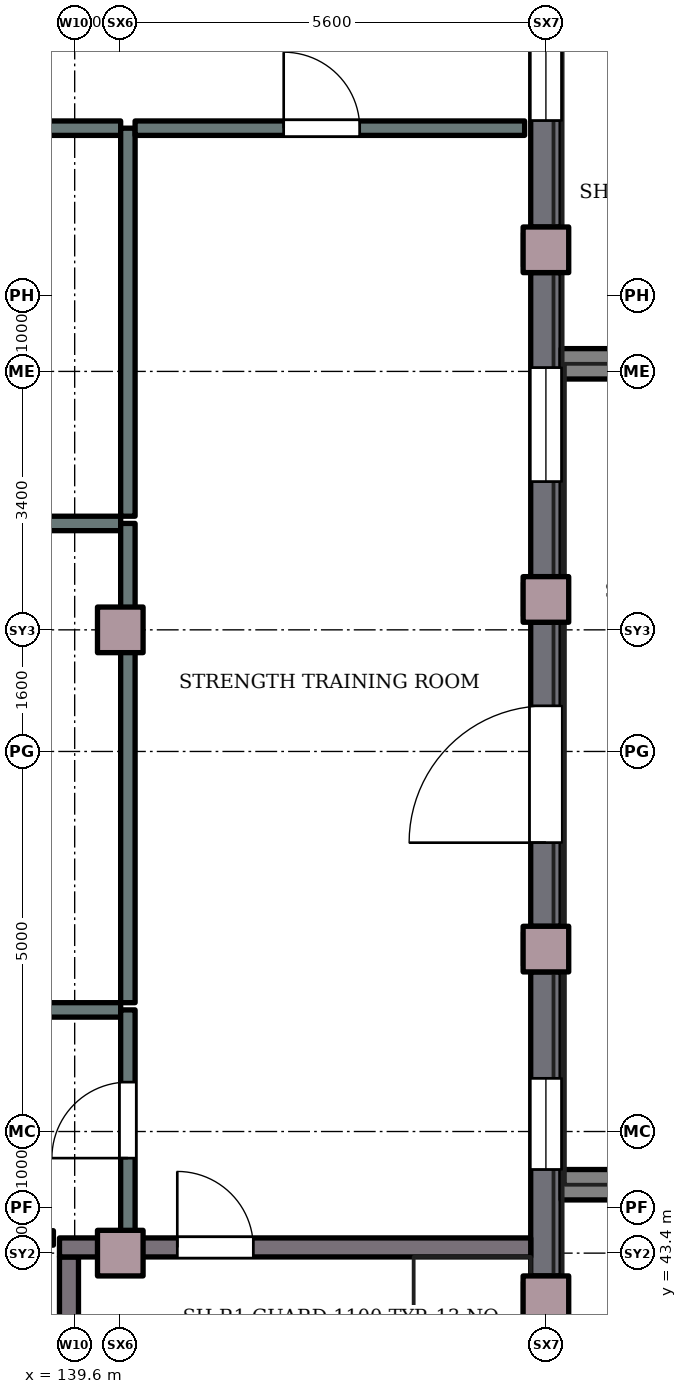
"""IFC4 building model, lengths in metres.
Left out: names, types, materials, properties, quantities, classifications, styles, units other than length and angle.
Written with IfcOpenShell. Run it as: python <this file> out.ifc"""

import sys

from ifc_helpers import new_model, si_unit, direction, frame, frame_2d, origin, origin_2d, place, context, subcontext, project, spatial, rectangle, extrude, element, fill, save


model = new_model("IFC4")
c1 = context("Model", 3, precision=1e-05, world=origin(), true_north=direction((0.0, 1.0)))
c2 = subcontext(c1, "Body", "Model", "MODEL_VIEW")
j1 = project(units=[si_unit("LENGTHUNIT", "METRE"), si_unit("PLANEANGLEUNIT", "RADIAN")], contexts=[c1])
p1 = place(None, origin())
s1 = spatial("IfcSite", under=j1, at=p1, CompositionType="ELEMENT")
p2 = place(p1, origin())
s2 = spatial("IfcBuilding", under=s1, at=p2, CompositionType="ELEMENT")
p3 = place(p2, origin())
s3 = spatial("IfcBuildingStorey", under=s2, at=p3, CompositionType="ELEMENT", Elevation=0.0)
for number, where, z_axis, x_axis in (
    (1, (145.8, 42.8, 0.0), (0.0, 0.0, 1.0), (1.0, 0.0, 0.0)),
    (2, (145.8, 47.4, 0.0), (0.0, 0.0, 1.0), (1.0, 0.0, 0.0)),
    (3, (145.8, 52.0, 0.0), (0.0, 0.0, 1.0), (1.0, 0.0, 0.0)),
    (4, (145.8, 56.6, 0.0), (0.0, 0.0, 1.0), (1.0, 0.0, 0.0)),
    (5, (140.2, 51.6, 0.0), (0.0, 0.0, 1.0), (1.0, 0.0, 0.0)),
    (6, (140.2, 43.4, 0.0), (0.0, 0.0, 1.0), (1.0, 0.0, 0.0)),
):
    element("IfcColumn", number, at=place(p3, frame(where, z_axis=z_axis, x_axis=x_axis)), inside=s3, PredefinedType="COLUMN", context=c2, shape_type="SweptSolid", body=[
        extrude(rectangle(XDim=0.6, YDim=0.6, at=origin_2d()), origin(), (0.0, 0.0, 1.0), 4.2),
    ])
p4 = place(p3, frame((145.8, 43.1, 0.0), z_axis=(0.0, 0.0, 1.0), x_axis=(0.0, 1.0, 0.0)))
e7 = element("IfcWall", 7, at=p4, inside=s3, PredefinedType="SOLIDWALL", context=c2, shape_type="SweptSolid", body=[
    extrude(rectangle(XDim=4.0, YDim=0.4, at=frame_2d((2.0, 0.0))), origin(), (0.0, 0.0, 1.0), 4.2),
])
p5 = place(p4, frame((1.4, 0.0, 1.2)))
e8 = element("IfcOpeningElement", 8, at=p5, cuts=e7, PredefinedType="OPENING", context=c2, shape_type="SweptSolid", body=[
    extrude(rectangle(XDim=1.2, YDim=1.8, at=frame_2d((0.6, 0.9))), frame((0.0, 0.21, 0.0), z_axis=(0.0, -1.0, 0.0), x_axis=(1.0, 0.0, 0.0)), (0.0, 0.0, 1.0), 0.42),
])
p6 = place(p3, frame((145.8, 47.7, 0.0), z_axis=(0.0, 0.0, 1.0), x_axis=(0.0, 1.0, 0.0)))
e9 = element("IfcWall", 9, at=p6, inside=s3, PredefinedType="SOLIDWALL", context=c2, shape_type="SweptSolid", body=[
    extrude(rectangle(XDim=4.0, YDim=0.4, at=frame_2d((2.0, 0.0))), origin(), (0.0, 0.0, 1.0), 4.2),
])
p7 = place(p6, frame((1.1, 0.0, 0.0)))
e10 = element("IfcOpeningElement", 10, at=p7, cuts=e9, PredefinedType="OPENING", context=c2, shape_type="SweptSolid", body=[
    extrude(rectangle(XDim=1.8, YDim=2.1, at=frame_2d((0.9, 1.05))), frame((0.0, 0.21, 0.0), z_axis=(0.0, -1.0, 0.0), x_axis=(1.0, 0.0, 0.0)), (0.0, 0.0, 1.0), 0.42),
])
p8 = place(p3, frame((145.8, 52.3, 0.0), z_axis=(0.0, 0.0, 1.0), x_axis=(0.0, 1.0, 0.0)))
e11 = element("IfcWall", 11, at=p8, inside=s3, PredefinedType="SOLIDWALL", context=c2, shape_type="SweptSolid", body=[
    extrude(rectangle(XDim=4.0, YDim=0.4, at=frame_2d((2.0, 0.0))), origin(), (0.0, 0.0, 1.0), 4.2),
])
p9 = place(p8, frame((1.25, 0.0, 0.9)))
e12 = element("IfcOpeningElement", 12, at=p9, cuts=e11, PredefinedType="OPENING", context=c2, shape_type="SweptSolid", body=[
    extrude(rectangle(XDim=1.5, YDim=2.0, at=frame_2d((0.75, 1.0))), frame((0.0, 0.21, 0.0), z_axis=(0.0, -1.0, 0.0), x_axis=(1.0, 0.0, 0.0)), (0.0, 0.0, 1.0), 0.42),
])
p10 = place(p3, frame((145.8, 56.9, 0.0), z_axis=(0.0, 0.0, 1.0), x_axis=(0.0, 1.0, 0.0)))
e13 = element("IfcWall", 13, at=p10, inside=s3, PredefinedType="SOLIDWALL", context=c2, shape_type="SweptSolid", body=[
    extrude(rectangle(XDim=4.0, YDim=0.4, at=frame_2d((2.0, 0.0))), origin(), (0.0, 0.0, 1.0), 4.2),
])
p11 = place(p10, frame((1.4, 0.0, 1.2)))
e14 = element("IfcOpeningElement", 14, at=p11, cuts=e13, PredefinedType="OPENING", context=c2, shape_type="SweptSolid", body=[
    extrude(rectangle(XDim=1.2, YDim=1.8, at=frame_2d((0.6, 0.9))), frame((0.0, 0.21, 0.0), z_axis=(0.0, -1.0, 0.0), x_axis=(1.0, 0.0, 0.0)), (0.0, 0.0, 1.0), 0.42),
])
p12 = place(p3, frame((139.525, 38.4, 0.0), z_axis=(0.0, 0.0, 1.0), x_axis=(0.0, 1.0, 0.0)))
e15 = element("IfcWall", 15, at=p12, inside=s3, PredefinedType="SHEAR", context=c2, shape_type="SweptSolid", body=[
    extrude(rectangle(XDim=4.95, YDim=0.25, at=frame_2d((2.475, 0.0))), origin(), (0.0, 0.0, 1.0), 4.2),
])
p13 = place(p3, frame((139.4, 43.475, 0.0), z_axis=(0.0, 0.0, 1.0), x_axis=(1.0, 0.0, 0.0)))
e16 = element("IfcWall", 16, at=p13, inside=s3, PredefinedType="SHEAR", context=c2, shape_type="SweptSolid", body=[
    extrude(rectangle(XDim=6.2, YDim=0.25, at=frame_2d((3.1, 0.0))), origin(), (0.0, 0.0, 1.0), 4.2),
])
p14 = place(p13, frame((1.55, 0.0, 0.0)))
e17 = element("IfcOpeningElement", 17, at=p14, cuts=e16, PredefinedType="OPENING", context=c2, shape_type="SweptSolid", body=[
    extrude(rectangle(XDim=1.0, YDim=2.1, at=frame_2d((0.5, 1.05))), frame((0.0, 0.135, 0.0), z_axis=(0.0, -1.0, 0.0), x_axis=(1.0, 0.0, 0.0)), (0.0, 0.0, 1.0), 0.27),
])
for number, where, z_axis, x_axis in (
    (18, (148.1, 55.1, 0.0), (0.0, 0.0, 1.0), (-1.0, 0.0, 0.0)),
    (19, (148.1, 44.3, 0.0), (0.0, 0.0, 1.0), (-1.0, 0.0, 0.0)),
):
    element("IfcWall", number, at=place(p3, frame(where, z_axis=z_axis, x_axis=x_axis)), inside=s3, PredefinedType="STANDARD", context=c2, shape_type="SweptSolid", body=[
        extrude(rectangle(XDim=2.1, YDim=0.4, at=frame_2d((1.05, 0.0))), origin(), (0.0, 0.0, 1.0), 4.2),
    ])
p15 = place(p3, frame((139.32, 43.6, 0.0), z_axis=(0.0, 0.0, 1.0), x_axis=(-1.0, 0.0, 0.0)))
e20 = element("IfcWall", 20, at=p15, inside=s3, PredefinedType="PARTITIONING", context=c2, shape_type="SweptSolid", body=[
    extrude(rectangle(XDim=1.825, YDim=0.19, at=frame_2d((0.913, 0.0))), origin(), (0.0, 0.0, 1.0), 3.9),
])
p16 = place(p15, frame((0.57, 0.0, 0.0)))
e21 = element("IfcOpeningElement", 21, at=p16, cuts=e20, PredefinedType="OPENING", context=c2, shape_type="SweptSolid", body=[
    extrude(rectangle(XDim=0.9, YDim=2.1, at=frame_2d((0.45, 1.05))), frame((0.0, 0.105, 0.0), z_axis=(0.0, -1.0, 0.0), x_axis=(1.0, 0.0, 0.0)), (0.0, 0.0, 1.0), 0.21),
])
p17 = place(p3, frame((140.205, 46.6, 0.0), z_axis=(0.0, 0.0, 1.0), x_axis=(-1.0, 0.0, 0.0)))
e22 = element("IfcWall", 22, at=p17, inside=s3, PredefinedType="PARTITIONING", context=c2, shape_type="SweptSolid", body=[
    extrude(rectangle(XDim=4.96, YDim=0.19, at=frame_2d((2.48, 0.0))), origin(), (0.0, 0.0, 1.0), 3.9),
])
p18 = place(p17, frame((2.005, 0.0, 0.0)))
e23 = element("IfcOpeningElement", 23, at=p18, cuts=e22, PredefinedType="OPENING", context=c2, shape_type="SweptSolid", body=[
    extrude(rectangle(XDim=1.0, YDim=2.1, at=frame_2d((0.5, 1.05))), frame((0.0, 0.105, 0.0), z_axis=(0.0, -1.0, 0.0), x_axis=(1.0, 0.0, 0.0)), (0.0, 0.0, 1.0), 0.21),
])
p19 = place(p3, frame((140.205, 53.0, 0.0), z_axis=(0.0, 0.0, 1.0), x_axis=(-1.0, 0.0, 0.0)))
e24 = element("IfcWall", 24, at=p19, inside=s3, PredefinedType="PARTITIONING", context=c2, shape_type="SweptSolid", body=[
    extrude(rectangle(XDim=4.96, YDim=0.19, at=frame_2d((2.48, 0.0))), origin(), (0.0, 0.0, 1.0), 3.9),
])
p20 = place(p3, frame((140.205, 58.2, 0.0), z_axis=(0.0, 0.0, 1.0), x_axis=(-1.0, 0.0, 0.0)))
e25 = element("IfcWall", 25, at=p20, inside=s3, PredefinedType="PARTITIONING", context=c2, shape_type="SweptSolid", body=[
    extrude(rectangle(XDim=4.96, YDim=0.19, at=frame_2d((2.48, 0.0))), origin(), (0.0, 0.0, 1.0), 3.9),
])
p21 = place(p20, frame((1.955, 0.0, 0.0)))
e26 = element("IfcOpeningElement", 26, at=p21, cuts=e25, PredefinedType="OPENING", context=c2, shape_type="SweptSolid", body=[
    extrude(rectangle(XDim=1.0, YDim=2.1, at=frame_2d((0.5, 1.05))), frame((0.0, 0.105, 0.0), z_axis=(0.0, -1.0, 0.0), x_axis=(1.0, 0.0, 0.0)), (0.0, 0.0, 1.0), 0.21),
])
p22 = place(p3, frame((140.3, 43.68, 0.0), z_axis=(0.0, 0.0, 1.0), x_axis=(0.0, 1.0, 0.0)))
e27 = element("IfcWall", 27, at=p22, inside=s3, PredefinedType="PARTITIONING", context=c2, shape_type="SweptSolid", body=[
    extrude(rectangle(XDim=2.92, YDim=0.19, at=frame_2d((1.46, 0.0))), origin(), (0.0, 0.0, 1.0), 3.9),
])
p23 = place(p22, frame((0.97, 0.0, 0.0)))
e28 = element("IfcOpeningElement", 28, at=p23, cuts=e27, PredefinedType="OPENING", context=c2, shape_type="SweptSolid", body=[
    extrude(rectangle(XDim=1.0, YDim=2.1, at=frame_2d((0.5, 1.05))), frame((0.0, 0.105, 0.0), z_axis=(0.0, -1.0, 0.0), x_axis=(1.0, 0.0, 0.0)), (0.0, 0.0, 1.0), 0.21),
])
p24 = place(p3, frame((140.3, 46.695, 0.0), z_axis=(0.0, 0.0, 1.0), x_axis=(0.0, 1.0, 0.0)))
e29 = element("IfcWall", 29, at=p24, inside=s3, PredefinedType="PARTITIONING", context=c2, shape_type="SweptSolid", body=[
    extrude(rectangle(XDim=6.305, YDim=0.19, at=frame_2d((3.152, 0.0))), origin(), (0.0, 0.0, 1.0), 3.9),
])
p25 = place(p3, frame((140.3, 53.095, 0.0), z_axis=(0.0, 0.0, 1.0), x_axis=(0.0, 1.0, 0.0)))
e30 = element("IfcWall", 30, at=p25, inside=s3, PredefinedType="PARTITIONING", context=c2, shape_type="SweptSolid", body=[
    extrude(rectangle(XDim=5.105, YDim=0.19, at=frame_2d((2.552, 0.0))), origin(), (0.0, 0.0, 1.0), 3.9),
])
p26 = place(p3, frame((140.395, 58.2, 0.0), z_axis=(0.0, 0.0, 1.0), x_axis=(1.0, 0.0, 0.0)))
e31 = element("IfcWall", 31, at=p26, inside=s3, PredefinedType="PARTITIONING", context=c2, shape_type="SweptSolid", body=[
    extrude(rectangle(XDim=5.125, YDim=0.19, at=frame_2d((2.562, 0.0))), origin(), (0.0, 0.0, 1.0), 3.9),
])
p27 = place(p26, frame((1.955, 0.0, 0.0)))
e32 = element("IfcOpeningElement", 32, at=p27, cuts=e31, PredefinedType="OPENING", context=c2, shape_type="SweptSolid", body=[
    extrude(rectangle(XDim=1.0, YDim=2.1, at=frame_2d((0.5, 1.05))), frame((0.0, 0.105, 0.0), z_axis=(0.0, -1.0, 0.0), x_axis=(1.0, 0.0, 0.0)), (0.0, 0.0, 1.0), 0.21),
])
p28 = place(p3, frame((145.6, 42.58, 0.0), z_axis=(0.0, 0.0, 1.0), x_axis=(0.0, 1.0, 0.0)))
e33 = element("IfcWall", 33, at=p28, inside=s3, PredefinedType="PARTITIONING", context=c2, shape_type="SweptSolid", body=[
    extrude(rectangle(XDim=0.44, YDim=0.19, at=frame_2d((0.22, 0.0))), origin(), (0.0, 0.0, 1.0), 3.9),
])
p29 = place(p3, frame((145.6, 47.18, 0.0), z_axis=(0.0, 0.0, 1.0), x_axis=(0.0, 1.0, 0.0)))
e34 = element("IfcWall", 34, at=p29, inside=s3, PredefinedType="PARTITIONING", context=c2, shape_type="SweptSolid", body=[
    extrude(rectangle(XDim=0.44, YDim=0.19, at=frame_2d((0.22, 0.0))), origin(), (0.0, 0.0, 1.0), 3.9),
])
p30 = place(p3, frame((145.6, 51.78, 0.0), z_axis=(0.0, 0.0, 1.0), x_axis=(0.0, 1.0, 0.0)))
e35 = element("IfcWall", 35, at=p30, inside=s3, PredefinedType="PARTITIONING", context=c2, shape_type="SweptSolid", body=[
    extrude(rectangle(XDim=0.44, YDim=0.19, at=frame_2d((0.22, 0.0))), origin(), (0.0, 0.0, 1.0), 3.9),
])
p31 = place(p3, frame((145.6, 56.38, 0.0), z_axis=(0.0, 0.0, 1.0), x_axis=(0.0, 1.0, 0.0)))
e36 = element("IfcWall", 36, at=p31, inside=s3, PredefinedType="PARTITIONING", context=c2, shape_type="SweptSolid", body=[
    extrude(rectangle(XDim=0.44, YDim=0.19, at=frame_2d((0.22, 0.0))), origin(), (0.0, 0.0, 1.0), 3.9),
])
p32 = place(p7, origin())
e37 = element("IfcDoor", 37, at=p32, inside=s3, OperationType="DOUBLE_DOOR_SINGLE_SWING", PredefinedType="DOOR", context=c2, shape_type="SweptSolid", body=[
    extrude(rectangle(XDim=1.8, YDim=2.1, at=frame_2d((0.9, 1.05))), frame((0.0, 0.025, 0.0), z_axis=(0.0, -1.0, 0.0), x_axis=(1.0, 0.0, 0.0)), (0.0, 0.0, 1.0), 0.05),
])
fill(e10, e37)
p33 = place(p5, origin())
e38 = element("IfcWindow", 38, at=p33, inside=s3, PartitioningType="SINGLE_PANEL", PredefinedType="WINDOW", context=c2, shape_type="SweptSolid", body=[
    extrude(rectangle(XDim=1.2, YDim=1.8, at=frame_2d((0.6, 0.9))), frame((0.0, 0.03, 0.0), z_axis=(0.0, -1.0, 0.0), x_axis=(1.0, 0.0, 0.0)), (0.0, 0.0, 1.0), 0.06),
])
fill(e8, e38)
p34 = place(p9, origin())
e39 = element("IfcWindow", 39, at=p34, inside=s3, PartitioningType="SINGLE_PANEL", PredefinedType="WINDOW", context=c2, shape_type="SweptSolid", body=[
    extrude(rectangle(XDim=1.5, YDim=2.0, at=frame_2d((0.75, 1.0))), frame((0.0, 0.03, 0.0), z_axis=(0.0, -1.0, 0.0), x_axis=(1.0, 0.0, 0.0)), (0.0, 0.0, 1.0), 0.06),
])
fill(e12, e39)
p35 = place(p11, origin())
e40 = element("IfcWindow", 40, at=p35, inside=s3, PartitioningType="SINGLE_PANEL", PredefinedType="WINDOW", context=c2, shape_type="SweptSolid", body=[
    extrude(rectangle(XDim=1.2, YDim=1.8, at=frame_2d((0.6, 0.9))), frame((0.0, 0.03, 0.0), z_axis=(0.0, -1.0, 0.0), x_axis=(1.0, 0.0, 0.0)), (0.0, 0.0, 1.0), 0.06),
])
fill(e14, e40)
p36 = place(p14, origin())
e41 = element("IfcDoor", 41, at=p36, inside=s3, OperationType="SINGLE_SWING_LEFT", PredefinedType="DOOR", context=c2, shape_type="SweptSolid", body=[
    extrude(rectangle(XDim=1.0, YDim=2.1, at=frame_2d((0.5, 1.05))), frame((0.0, 0.025, 0.0), z_axis=(0.0, -1.0, 0.0), x_axis=(1.0, 0.0, 0.0)), (0.0, 0.0, 1.0), 0.05),
])
fill(e17, e41)
p37 = place(p23, origin())
e42 = element("IfcDoor", 42, at=p37, inside=s3, OperationType="SINGLE_SWING_LEFT", PredefinedType="DOOR", context=c2, shape_type="SweptSolid", body=[
    extrude(rectangle(XDim=1.0, YDim=2.1, at=frame_2d((0.5, 1.05))), frame((0.0, 0.025, 0.0), z_axis=(0.0, -1.0, 0.0), x_axis=(1.0, 0.0, 0.0)), (0.0, 0.0, 1.0), 0.05),
])
fill(e28, e42)
p38 = place(p27, origin())
e43 = element("IfcDoor", 43, at=p38, inside=s3, OperationType="SINGLE_SWING_LEFT", PredefinedType="DOOR", context=c2, shape_type="SweptSolid", body=[
    extrude(rectangle(XDim=1.0, YDim=2.1, at=frame_2d((0.5, 1.05))), frame((0.0, 0.025, 0.0), z_axis=(0.0, -1.0, 0.0), x_axis=(1.0, 0.0, 0.0)), (0.0, 0.0, 1.0), 0.05),
])
fill(e32, e43)
save(model, sys.argv[1])
